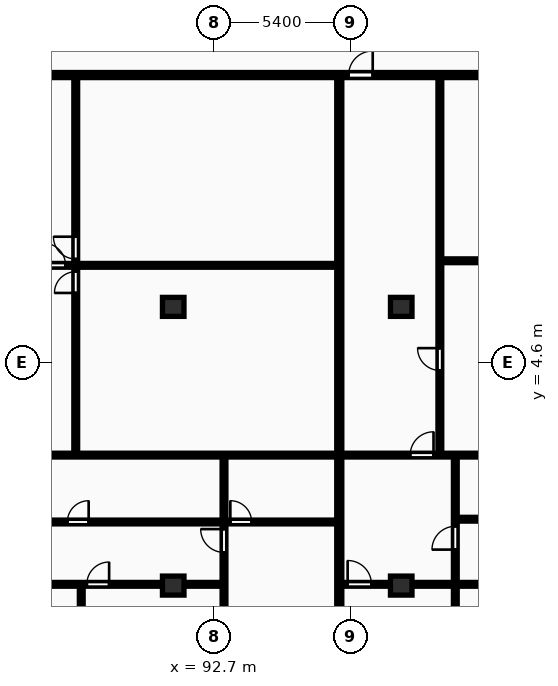
"""IFC4 building model, lengths in metres.
Left out: names, types, materials, properties, quantities, classifications, styles, units other than length and angle.
Written with IfcOpenShell. Run it as: python <this file> out.ifc"""

import sys

from ifc_helpers import new_model, si_unit, direction, frame, frame_2d, origin, origin_2d, place, context, subcontext, project, spatial, rectangle, extrude, element, fill, save


model = new_model("IFC4")
c1 = context("Model", 3, precision=1e-05, world=origin(), true_north=direction((0.0, 1.0)))
c2 = subcontext(c1, "Body", "Model", "MODEL_VIEW")
j1 = project(units=[si_unit("LENGTHUNIT", "METRE"), si_unit("PLANEANGLEUNIT", "RADIAN")], contexts=[c1])
p1 = place(None, origin())
s1 = spatial("IfcSite", under=j1, at=p1, CompositionType="ELEMENT")
p2 = place(p1, origin())
s2 = spatial("IfcBuilding", under=s1, at=p2, CompositionType="ELEMENT")
p3 = place(p2, frame((0.0, 0.0, 126.3)))
s3 = spatial("IfcBuildingStorey", under=s2, at=p3, CompositionType="ELEMENT", Elevation=126.3)
for number, where, z_axis, x_axis in (
    (1, (91.1, -4.2, 0.0), (0.0, 0.0, 1.0), (1.0, 0.0, 0.0)),
    (2, (91.1, 6.8, 0.0), (0.0, 0.0, 1.0), (1.0, 0.0, 0.0)),
    (3, (100.1, -4.2, 0.0), (0.0, 0.0, 1.0), (1.0, 0.0, 0.0)),
    (4, (100.1, 6.8, 0.0), (0.0, 0.0, 1.0), (1.0, 0.0, 0.0)),
):
    element("IfcColumn", number, at=place(p3, frame(where, z_axis=z_axis, x_axis=x_axis)), inside=s3, PredefinedType="COLUMN", context=c2, shape_type="SweptSolid", body=[
        extrude(rectangle(XDim=0.85, YDim=0.75, at=origin_2d()), origin(), (0.0, 0.0, 1.0), 3.25),
    ])
p4 = place(p3, frame((97.655, -8.7, 0.0), z_axis=(0.0, 0.0, 1.0), x_axis=(0.0, 1.0, 0.0)))
e5 = element("IfcWall", 5, at=p4, inside=s3, PredefinedType="PARTITIONING", context=c2, shape_type="SweptSolid", body=[
    extrude(rectangle(XDim=24.57, YDim=0.2, at=frame_2d((12.285, 0.0))), origin(), (0.0, 0.0, 1.0), 2.97),
])
p5 = place(p3, frame((87.252, 0.99, 0.0), z_axis=(0.0, 0.0, 1.0), x_axis=(0.0, 1.0, 0.0)))
e6 = element("IfcWall", 6, at=p5, inside=s3, PredefinedType="PARTITIONING", context=c2, shape_type="SweptSolid", body=[
    extrude(rectangle(XDim=14.9, YDim=0.15, at=frame_2d((7.45, 0.0))), origin(), (0.0, 0.0, 1.0), 2.97),
])
p6 = place(p5, frame((6.36, 0.0, 0.0)))
e7 = element("IfcOpeningElement", 7, at=p6, cuts=e6, PredefinedType="OPENING", context=c2, shape_type="SweptSolid", body=[
    extrude(rectangle(XDim=0.84, YDim=2.04, at=frame_2d((0.42, 1.02))), frame((0.0, 0.085, 0.0), z_axis=(0.0, -1.0, 0.0), x_axis=(1.0, 0.0, 0.0)), (0.0, 0.0, 1.0), 0.17),
])
p7 = place(p5, frame((7.7, 0.0, 0.0)))
e8 = element("IfcOpeningElement", 8, at=p7, cuts=e6, PredefinedType="OPENING", context=c2, shape_type="SweptSolid", body=[
    extrude(rectangle(XDim=0.88, YDim=2.06, at=frame_2d((0.44, 1.03))), frame((0.0, 0.085, 0.0), z_axis=(0.0, -1.0, 0.0), x_axis=(1.0, 0.0, 0.0)), (0.0, 0.0, 1.0), 0.17),
])
p8 = place(p3, frame((76.73, 8.44, 0.0), z_axis=(0.0, 0.0, 1.0), x_axis=(1.0, 0.0, 0.0)))
e9 = element("IfcWall", 9, at=p8, inside=s3, PredefinedType="PARTITIONING", context=c2, shape_type="SweptSolid", body=[
    extrude(rectangle(XDim=20.844, YDim=0.15, at=frame_2d((10.422, 0.0))), origin(), (0.0, 0.0, 1.0), 2.97),
])
p9 = place(p8, frame((9.241, 0.0, 0.0)))
e10 = element("IfcOpeningElement", 10, at=p9, cuts=e9, PredefinedType="OPENING", context=c2, shape_type="SweptSolid", body=[
    extrude(rectangle(XDim=0.88, YDim=2.06, at=frame_2d((0.44, 1.03))), frame((0.0, 0.085, 0.0), z_axis=(0.0, -1.0, 0.0), x_axis=(1.0, 0.0, 0.0)), (0.0, 0.0, 1.0), 0.17),
])
p10 = place(p3, frame((87.47, -8.7, 0.0), z_axis=(0.0, 0.0, 1.0), x_axis=(0.0, 1.0, 0.0)))
e11 = element("IfcWall", 11, at=p10, inside=s3, PredefinedType="PARTITIONING", context=c2, shape_type="SweptSolid", body=[
    extrude(rectangle(XDim=4.47, YDim=0.15, at=frame_2d((2.235, 0.0))), origin(), (0.0, 0.0, 1.0), 2.97),
])
p11 = place(p3, frame((93.104, -1.67, 0.0), z_axis=(0.0, 0.0, 1.0), x_axis=(0.0, 1.0, 0.0)))
e12 = element("IfcWall", 12, at=p11, inside=s3, PredefinedType="PARTITIONING", context=c2, shape_type="SweptSolid", body=[
    extrude(rectangle(XDim=2.58, YDim=0.15, at=frame_2d((1.29, 0.0))), origin(), (0.0, 0.0, 1.0), 2.97),
])
p12 = place(p3, frame((93.104, -8.7, 0.0), z_axis=(0.0, 0.0, 1.0), x_axis=(0.0, 1.0, 0.0)))
e13 = element("IfcWall", 13, at=p12, inside=s3, PredefinedType="PARTITIONING", context=c2, shape_type="SweptSolid", body=[
    extrude(rectangle(XDim=6.99, YDim=0.15, at=frame_2d((3.495, 0.0))), origin(), (0.0, 0.0, 1.0), 2.97),
])
p13 = place(p12, frame((5.81, 0.0, 0.0)))
e14 = element("IfcOpeningElement", 14, at=p13, cuts=e13, PredefinedType="OPENING", context=c2, shape_type="SweptSolid", body=[
    extrude(rectangle(XDim=0.92, YDim=2.08, at=frame_2d((0.46, 1.04))), frame((0.0, 0.085, 0.0), z_axis=(0.0, -1.0, 0.0), x_axis=(1.0, 0.0, 0.0)), (0.0, 0.0, 1.0), 0.17),
])
p14 = place(p3, frame((77.11, -1.69, 0.0), z_axis=(0.0, 0.0, 1.0), x_axis=(1.0, 0.0, 0.0)))
e15 = element("IfcWall", 15, at=p14, inside=s3, PredefinedType="PARTITIONING", context=c2, shape_type="SweptSolid", body=[
    extrude(rectangle(XDim=20.464, YDim=0.15, at=frame_2d((10.232, 0.0))), origin(), (0.0, 0.0, 1.0), 2.97),
])
p15 = place(p14, frame((1.191, 0.0, 0.0)))
e16 = element("IfcOpeningElement", 16, at=p15, cuts=e15, PredefinedType="OPENING", context=c2, shape_type="SweptSolid", body=[
    extrude(rectangle(XDim=0.84, YDim=2.04, at=frame_2d((0.42, 1.02))), frame((0.0, 0.085, 0.0), z_axis=(0.0, -1.0, 0.0), x_axis=(1.0, 0.0, 0.0)), (0.0, 0.0, 1.0), 0.17),
])
p16 = place(p14, frame((9.812, 0.0, 0.0)))
e17 = element("IfcOpeningElement", 17, at=p16, cuts=e15, PredefinedType="OPENING", context=c2, shape_type="SweptSolid", body=[
    extrude(rectangle(XDim=0.84, YDim=2.04, at=frame_2d((0.42, 1.02))), frame((0.0, 0.085, 0.0), z_axis=(0.0, -1.0, 0.0), x_axis=(1.0, 0.0, 0.0)), (0.0, 0.0, 1.0), 0.17),
])
p17 = place(p14, frame((16.244, 0.0, 0.0)))
e18 = element("IfcOpeningElement", 18, at=p17, cuts=e15, PredefinedType="OPENING", context=c2, shape_type="SweptSolid", body=[
    extrude(rectangle(XDim=0.84, YDim=2.04, at=frame_2d((0.42, 1.02))), frame((0.0, 0.085, 0.0), z_axis=(0.0, -1.0, 0.0), x_axis=(1.0, 0.0, 0.0)), (0.0, 0.0, 1.0), 0.17),
])
p18 = place(p3, frame((72.78, 0.95, 0.0), z_axis=(0.0, 0.0, 1.0), x_axis=(1.0, 0.0, 0.0)))
e19 = element("IfcWall", 19, at=p18, inside=s3, PredefinedType="PARTITIONING", context=c2, shape_type="SweptSolid", body=[
    extrude(rectangle(XDim=24.794, YDim=0.15, at=frame_2d((12.397, 0.0))), origin(), (0.0, 0.0, 1.0), 2.97),
])
p19 = place(p18, frame((2.72, 0.0, 0.0)))
e20 = element("IfcOpeningElement", 20, at=p19, cuts=e19, PredefinedType="OPENING", context=c2, shape_type="SweptSolid", body=[
    extrude(rectangle(XDim=0.92, YDim=2.08, at=frame_2d((0.46, 1.04))), frame((0.0, 0.085, 0.0), z_axis=(0.0, -1.0, 0.0), x_axis=(1.0, 0.0, 0.0)), (0.0, 0.0, 1.0), 0.17),
])
p20 = place(p3, frame((72.78, -4.15, 0.0), z_axis=(0.0, 0.0, 1.0), x_axis=(1.0, 0.0, 0.0)))
e21 = element("IfcWall", 21, at=p20, inside=s3, PredefinedType="PARTITIONING", context=c2, shape_type="SweptSolid", body=[
    extrude(rectangle(XDim=20.324, YDim=0.15, at=frame_2d((10.162, 0.0))), origin(), (0.0, 0.0, 1.0), 2.663),
])
p21 = place(p20, frame((3.1, 0.0, 0.0)))
e22 = element("IfcOpeningElement", 22, at=p21, cuts=e21, PredefinedType="OPENING", context=c2, shape_type="SweptSolid", body=[
    extrude(rectangle(XDim=0.94, YDim=2.1, at=frame_2d((0.47, 1.05))), frame((0.0, 0.085, 0.0), z_axis=(0.0, -1.0, 0.0), x_axis=(1.0, 0.0, 0.0)), (0.0, 0.0, 1.0), 0.17),
])
p22 = place(p20, frame((6.76, 0.0, 0.0)))
e23 = element("IfcOpeningElement", 23, at=p22, cuts=e21, PredefinedType="OPENING", context=c2, shape_type="SweptSolid", body=[
    extrude(rectangle(XDim=0.88, YDim=2.06, at=frame_2d((0.44, 1.03))), frame((0.0, 0.085, 0.0), z_axis=(0.0, -1.0, 0.0), x_axis=(1.0, 0.0, 0.0)), (0.0, 0.0, 1.0), 0.17),
])
p23 = place(p20, frame((10.952, 0.0, 0.0)))
e24 = element("IfcOpeningElement", 24, at=p23, cuts=e21, PredefinedType="OPENING", context=c2, shape_type="SweptSolid", body=[
    extrude(rectangle(XDim=0.88, YDim=2.06, at=frame_2d((0.44, 1.03))), frame((0.0, 0.085, 0.0), z_axis=(0.0, -1.0, 0.0), x_axis=(1.0, 0.0, 0.0)), (0.0, 0.0, 1.0), 0.17),
])
p24 = place(p20, frame((14.91, 0.0, 0.0)))
e25 = element("IfcOpeningElement", 25, at=p24, cuts=e21, PredefinedType="OPENING", context=c2, shape_type="SweptSolid", body=[
    extrude(rectangle(XDim=0.88, YDim=2.06, at=frame_2d((0.44, 1.03))), frame((0.0, 0.085, 0.0), z_axis=(0.0, -1.0, 0.0), x_axis=(1.0, 0.0, 0.0)), (0.0, 0.0, 1.0), 0.17),
])
p25 = place(p3, frame((101.685, 8.62, 0.0), z_axis=(0.0, 0.0, 1.0), x_axis=(1.0, 0.0, 0.0)))
e26 = element("IfcWall", 26, at=p25, inside=s3, PredefinedType="PARTITIONING", context=c2, shape_type="SweptSolid", body=[
    extrude(rectangle(XDim=14.522, YDim=0.15, at=frame_2d((7.261, 0.0))), origin(), (0.0, 0.0, 1.0), 2.97),
])
p26 = place(p25, frame((4.903, 0.0, 0.0)))
e27 = element("IfcOpeningElement", 27, at=p26, cuts=e26, PredefinedType="OPENING", context=c2, shape_type="SweptSolid", body=[
    extrude(rectangle(XDim=0.88, YDim=2.06, at=frame_2d((0.44, 1.03))), frame((0.0, 0.085, 0.0), z_axis=(0.0, -1.0, 0.0), x_axis=(1.0, 0.0, 0.0)), (0.0, 0.0, 1.0), 0.17),
])
p27 = place(p3, frame((101.625, 0.99, 0.0), z_axis=(0.0, 0.0, 1.0), x_axis=(0.0, 1.0, 0.0)))
e28 = element("IfcWall", 28, at=p27, inside=s3, PredefinedType="PARTITIONING", context=c2, shape_type="SweptSolid", body=[
    extrude(rectangle(XDim=14.9, YDim=0.15, at=frame_2d((7.45, 0.0))), origin(), (0.0, 0.0, 1.0), 2.97),
])
p28 = place(p27, frame((3.302, 0.0, 0.0)))
e29 = element("IfcOpeningElement", 29, at=p28, cuts=e28, PredefinedType="OPENING", context=c2, shape_type="SweptSolid", body=[
    extrude(rectangle(XDim=0.88, YDim=2.06, at=frame_2d((0.44, 1.03))), frame((0.0, 0.085, 0.0), z_axis=(0.0, -1.0, 0.0), x_axis=(1.0, 0.0, 0.0)), (0.0, 0.0, 1.0), 0.17),
])
p29 = place(p3, frame((102.235, -8.7, 0.0), z_axis=(0.0, 0.0, 1.0), x_axis=(0.0, 1.0, 0.0)))
e30 = element("IfcWall", 30, at=p29, inside=s3, PredefinedType="PARTITIONING", context=c2, shape_type="SweptSolid", body=[
    extrude(rectangle(XDim=9.61, YDim=0.15, at=frame_2d((4.805, 0.0))), origin(), (0.0, 0.0, 1.0), 2.97),
])
p30 = place(p29, frame((5.92, 0.0, 0.0)))
e31 = element("IfcOpeningElement", 31, at=p30, cuts=e30, PredefinedType="OPENING", context=c2, shape_type="SweptSolid", body=[
    extrude(rectangle(XDim=0.92, YDim=2.08, at=frame_2d((0.46, 1.04))), frame((0.0, 0.085, 0.0), z_axis=(0.0, -1.0, 0.0), x_axis=(1.0, 0.0, 0.0)), (0.0, 0.0, 1.0), 0.17),
])
p31 = place(p3, frame((102.274, -1.58, 0.0), z_axis=(0.0, 0.0, 1.0), x_axis=(1.0, 0.0, 0.0)))
e32 = element("IfcWall", 32, at=p31, inside=s3, PredefinedType="PARTITIONING", context=c2, shape_type="SweptSolid", body=[
    extrude(rectangle(XDim=13.932, YDim=0.15, at=frame_2d((6.966, 0.0))), origin(), (0.0, 0.0, 1.0), 2.97),
])
p32 = place(p31, frame((1.034, 0.0, 0.0)))
e33 = element("IfcOpeningElement", 33, at=p32, cuts=e32, PredefinedType="OPENING", context=c2, shape_type="SweptSolid", body=[
    extrude(rectangle(XDim=0.84, YDim=2.04, at=frame_2d((0.42, 1.02))), frame((0.0, 0.085, 0.0), z_axis=(0.0, -1.0, 0.0), x_axis=(1.0, 0.0, 0.0)), (0.0, 0.0, 1.0), 0.17),
])
p33 = place(p31, frame((6.546, 0.0, 0.0)))
e34 = element("IfcOpeningElement", 34, at=p33, cuts=e32, PredefinedType="OPENING", context=c2, shape_type="SweptSolid", body=[
    extrude(rectangle(XDim=0.84, YDim=2.04, at=frame_2d((0.42, 1.02))), frame((0.0, 0.085, 0.0), z_axis=(0.0, -1.0, 0.0), x_axis=(1.0, 0.0, 0.0)), (0.0, 0.0, 1.0), 0.17),
])
p34 = place(p31, frame((9.932, 0.0, 0.0)))
e35 = element("IfcOpeningElement", 35, at=p34, cuts=e32, PredefinedType="OPENING", context=c2, shape_type="SweptSolid", body=[
    extrude(rectangle(XDim=0.84, YDim=2.04, at=frame_2d((0.42, 1.02))), frame((0.0, 0.085, 0.0), z_axis=(0.0, -1.0, 0.0), x_axis=(1.0, 0.0, 0.0)), (0.0, 0.0, 1.0), 0.17),
])
p35 = place(p3, frame((97.735, 0.95, 0.0), z_axis=(0.0, 0.0, 1.0), x_axis=(1.0, 0.0, 0.0)))
e36 = element("IfcWall", 36, at=p35, inside=s3, PredefinedType="PARTITIONING", context=c2, shape_type="SweptSolid", body=[
    extrude(rectangle(XDim=18.472, YDim=0.15, at=frame_2d((9.236, 0.0))), origin(), (0.0, 0.0, 1.0), 2.97),
])
p36 = place(p35, frame((2.72, 0.0, 0.0)))
e37 = element("IfcOpeningElement", 37, at=p36, cuts=e36, PredefinedType="OPENING", context=c2, shape_type="SweptSolid", body=[
    extrude(rectangle(XDim=0.92, YDim=2.08, at=frame_2d((0.46, 1.04))), frame((0.0, 0.085, 0.0), z_axis=(0.0, -1.0, 0.0), x_axis=(1.0, 0.0, 0.0)), (0.0, 0.0, 1.0), 0.17),
])
p37 = place(p3, frame((97.735, -4.15, 0.0), z_axis=(0.0, 0.0, 1.0), x_axis=(1.0, 0.0, 0.0)))
e38 = element("IfcWall", 38, at=p37, inside=s3, PredefinedType="PARTITIONING", context=c2, shape_type="SweptSolid", body=[
    extrude(rectangle(XDim=14.222, YDim=0.15, at=frame_2d((7.111, 0.0))), origin(), (0.0, 0.0, 1.0), 2.663),
])
p38 = place(p37, frame((0.25, 0.0, 0.0)))
e39 = element("IfcOpeningElement", 39, at=p38, cuts=e38, PredefinedType="OPENING", context=c2, shape_type="SweptSolid", body=[
    extrude(rectangle(XDim=0.94, YDim=2.1, at=frame_2d((0.47, 1.05))), frame((0.0, 0.085, 0.0), z_axis=(0.0, -1.0, 0.0), x_axis=(1.0, 0.0, 0.0)), (0.0, 0.0, 1.0), 0.17),
])
p39 = place(p37, frame((6.671, 0.0, 0.0)))
e40 = element("IfcOpeningElement", 40, at=p39, cuts=e38, PredefinedType="OPENING", context=c2, shape_type="SweptSolid", body=[
    extrude(rectangle(XDim=0.88, YDim=2.06, at=frame_2d((0.44, 1.03))), frame((0.0, 0.085, 0.0), z_axis=(0.0, -1.0, 0.0), x_axis=(1.0, 0.0, 0.0)), (0.0, 0.0, 1.0), 0.17),
])
p40 = place(p37, frame((12.985, 0.0, 0.0)))
e41 = element("IfcOpeningElement", 41, at=p40, cuts=e38, PredefinedType="OPENING", context=c2, shape_type="SweptSolid", body=[
    extrude(rectangle(XDim=0.88, YDim=2.06, at=frame_2d((0.44, 1.03))), frame((0.0, 0.085, 0.0), z_axis=(0.0, -1.0, 0.0), x_axis=(1.0, 0.0, 0.0)), (0.0, 0.0, 1.0), 0.17),
])
p41 = place(p3, frame((72.7, 15.95, 0.0), z_axis=(0.0, 0.0, 1.0), x_axis=(1.0, 0.0, 0.0)))
e42 = element("IfcWall", 42, at=p41, inside=s3, PredefinedType="PARTITIONING", context=c2, shape_type="SweptSolid", body=[
    extrude(rectangle(XDim=58.0, YDim=0.2, at=frame_2d((29.0, 0.0))), origin(), (0.0, 0.0, 1.0), 2.97),
])
p42 = place(p41, frame((2.77, 0.0, 0.0)))
e43 = element("IfcOpeningElement", 43, at=p42, cuts=e42, PredefinedType="OPENING", context=c2, shape_type="SweptSolid", body=[
    extrude(rectangle(XDim=0.95, YDim=2.15, at=frame_2d((0.475, 1.075))), frame((0.0, 0.11, 0.0), z_axis=(0.0, -1.0, 0.0), x_axis=(1.0, 0.0, 0.0)), (0.0, 0.0, 1.0), 0.22),
])
p43 = place(p41, frame((25.324, 0.0, 0.0)))
e44 = element("IfcOpeningElement", 44, at=p43, cuts=e42, PredefinedType="OPENING", context=c2, shape_type="SweptSolid", body=[
    extrude(rectangle(XDim=0.95, YDim=2.15, at=frame_2d((0.475, 1.075))), frame((0.0, 0.11, 0.0), z_axis=(0.0, -1.0, 0.0), x_axis=(1.0, 0.0, 0.0)), (0.0, 0.0, 1.0), 0.22),
])
p44 = place(p41, frame((46.356, 0.0, 0.0)))
e45 = element("IfcOpeningElement", 45, at=p44, cuts=e42, PredefinedType="OPENING", context=c2, shape_type="SweptSolid", body=[
    extrude(rectangle(XDim=0.95, YDim=2.15, at=frame_2d((0.475, 1.075))), frame((0.0, 0.11, 0.0), z_axis=(0.0, -1.0, 0.0), x_axis=(1.0, 0.0, 0.0)), (0.0, 0.0, 1.0), 0.22),
])
p45 = place(p6, origin())
e46 = element("IfcDoor", 46, at=p45, inside=s3, OperationType="SINGLE_SWING_LEFT", PredefinedType="DOOR", context=c2, shape_type="SweptSolid", body=[
    extrude(rectangle(XDim=0.84, YDim=2.04, at=frame_2d((0.42, 1.02))), frame((0.0, 0.025, 0.0), z_axis=(0.0, -1.0, 0.0), x_axis=(1.0, 0.0, 0.0)), (0.0, 0.0, 1.0), 0.05),
])
fill(e7, e46)
p46 = place(p7, origin())
e47 = element("IfcDoor", 47, at=p46, inside=s3, OperationType="SINGLE_SWING_RIGHT", PredefinedType="DOOR", context=c2, shape_type="SweptSolid", body=[
    extrude(rectangle(XDim=0.88, YDim=2.06, at=frame_2d((0.44, 1.03))), frame((0.0, 0.025, 0.0), z_axis=(0.0, -1.0, 0.0), x_axis=(1.0, 0.0, 0.0)), (0.0, 0.0, 1.0), 0.05),
])
fill(e8, e47)
p47 = place(p9, origin())
e48 = element("IfcDoor", 48, at=p47, inside=s3, OperationType="SINGLE_SWING_LEFT", PredefinedType="DOOR", context=c2, shape_type="SweptSolid", body=[
    extrude(rectangle(XDim=0.88, YDim=2.06, at=frame_2d((0.44, 1.03))), frame((0.0, 0.025, 0.0), z_axis=(0.0, -1.0, 0.0), x_axis=(1.0, 0.0, 0.0)), (0.0, 0.0, 1.0), 0.05),
])
fill(e10, e48)
p48 = place(p13, origin())
e49 = element("IfcDoor", 49, at=p48, inside=s3, OperationType="SINGLE_SWING_RIGHT", PredefinedType="DOOR", context=c2, shape_type="SweptSolid", body=[
    extrude(rectangle(XDim=0.92, YDim=2.08, at=frame_2d((0.46, 1.04))), frame((0.0, 0.025, 0.0), z_axis=(0.0, -1.0, 0.0), x_axis=(1.0, 0.0, 0.0)), (0.0, 0.0, 1.0), 0.05),
])
fill(e14, e49)
p49 = place(p16, origin())
e50 = element("IfcDoor", 50, at=p49, inside=s3, OperationType="SINGLE_SWING_RIGHT", PredefinedType="DOOR", context=c2, shape_type="SweptSolid", body=[
    extrude(rectangle(XDim=0.84, YDim=2.04, at=frame_2d((0.42, 1.02))), frame((0.0, 0.025, 0.0), z_axis=(0.0, -1.0, 0.0), x_axis=(1.0, 0.0, 0.0)), (0.0, 0.0, 1.0), 0.05),
])
fill(e17, e50)
p50 = place(p17, origin())
e51 = element("IfcDoor", 51, at=p50, inside=s3, OperationType="SINGLE_SWING_LEFT", PredefinedType="DOOR", context=c2, shape_type="SweptSolid", body=[
    extrude(rectangle(XDim=0.84, YDim=2.04, at=frame_2d((0.42, 1.02))), frame((0.0, 0.025, 0.0), z_axis=(0.0, -1.0, 0.0), x_axis=(1.0, 0.0, 0.0)), (0.0, 0.0, 1.0), 0.05),
])
fill(e18, e51)
p51 = place(p24, origin())
e52 = element("IfcDoor", 52, at=p51, inside=s3, OperationType="SINGLE_SWING_RIGHT", PredefinedType="DOOR", context=c2, shape_type="SweptSolid", body=[
    extrude(rectangle(XDim=0.88, YDim=2.06, at=frame_2d((0.44, 1.03))), frame((0.0, 0.025, 0.0), z_axis=(0.0, -1.0, 0.0), x_axis=(1.0, 0.0, 0.0)), (0.0, 0.0, 1.0), 0.05),
])
fill(e25, e52)
p52 = place(p28, origin())
e53 = element("IfcDoor", 53, at=p52, inside=s3, OperationType="SINGLE_SWING_RIGHT", PredefinedType="DOOR", context=c2, shape_type="SweptSolid", body=[
    extrude(rectangle(XDim=0.88, YDim=2.06, at=frame_2d((0.44, 1.03))), frame((0.0, 0.025, 0.0), z_axis=(0.0, -1.0, 0.0), x_axis=(1.0, 0.0, 0.0)), (0.0, 0.0, 1.0), 0.05),
])
fill(e29, e53)
p53 = place(p30, origin())
e54 = element("IfcDoor", 54, at=p53, inside=s3, OperationType="SINGLE_SWING_LEFT", PredefinedType="DOOR", context=c2, shape_type="SweptSolid", body=[
    extrude(rectangle(XDim=0.92, YDim=2.08, at=frame_2d((0.46, 1.04))), frame((0.0, 0.025, 0.0), z_axis=(0.0, -1.0, 0.0), x_axis=(1.0, 0.0, 0.0)), (0.0, 0.0, 1.0), 0.05),
])
fill(e31, e54)
p54 = place(p36, origin())
e55 = element("IfcDoor", 55, at=p54, inside=s3, OperationType="SINGLE_SWING_RIGHT", PredefinedType="DOOR", context=c2, shape_type="SweptSolid", body=[
    extrude(rectangle(XDim=0.92, YDim=2.08, at=frame_2d((0.46, 1.04))), frame((0.0, 0.025, 0.0), z_axis=(0.0, -1.0, 0.0), x_axis=(1.0, 0.0, 0.0)), (0.0, 0.0, 1.0), 0.05),
])
fill(e37, e55)
p55 = place(p38, origin())
e56 = element("IfcDoor", 56, at=p55, inside=s3, OperationType="SINGLE_SWING_LEFT", PredefinedType="DOOR", context=c2, shape_type="SweptSolid", body=[
    extrude(rectangle(XDim=0.94, YDim=2.1, at=frame_2d((0.47, 1.05))), frame((0.0, 0.025, 0.0), z_axis=(0.0, -1.0, 0.0), x_axis=(1.0, 0.0, 0.0)), (0.0, 0.0, 1.0), 0.05),
])
fill(e39, e56)
p56 = place(p43, origin())
e57 = element("IfcDoor", 57, at=p56, inside=s3, OperationType="SINGLE_SWING_RIGHT", PredefinedType="DOOR", context=c2, shape_type="SweptSolid", body=[
    extrude(rectangle(XDim=0.95, YDim=2.15, at=frame_2d((0.475, 1.075))), frame((0.0, 0.025, 0.0), z_axis=(0.0, -1.0, 0.0), x_axis=(1.0, 0.0, 0.0)), (0.0, 0.0, 1.0), 0.05),
])
fill(e44, e57)
save(model, sys.argv[1])
